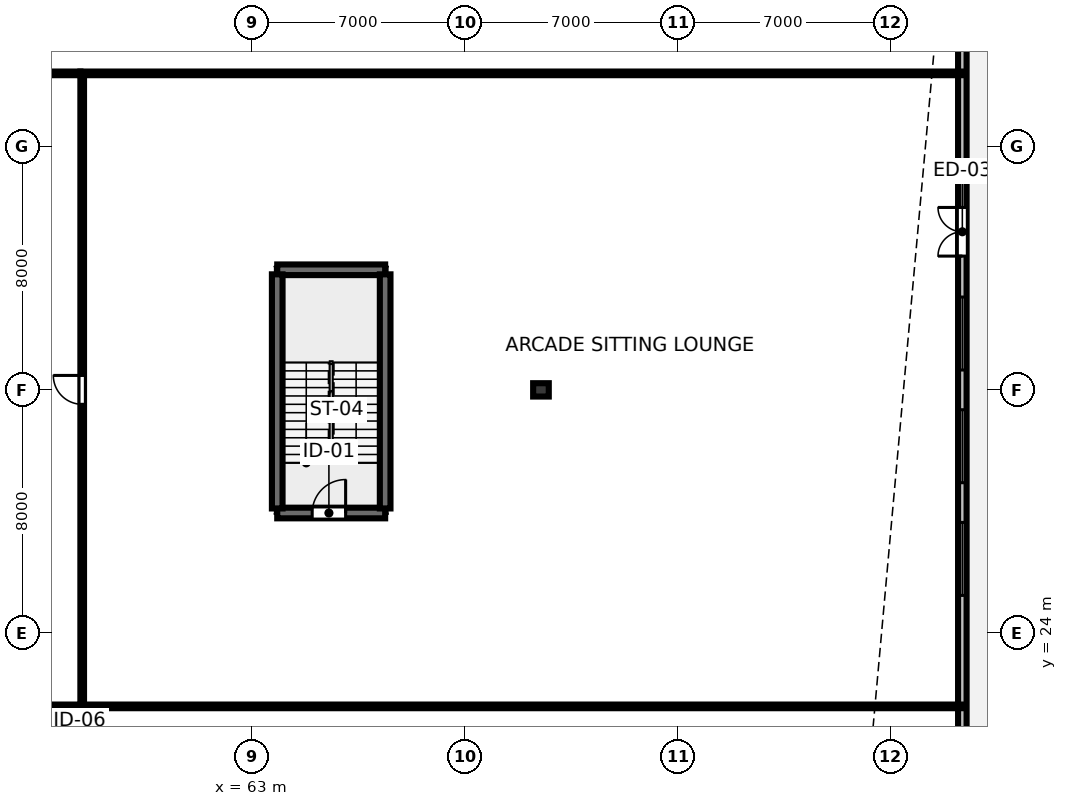
"""IFC4 building model, lengths in metres.
Left out: names, types, materials, properties, quantities, classifications, styles, units other than length and angle.
Written with IfcOpenShell. Run it as: python <this file> out.ifc"""

import sys

from ifc_helpers import new_model, si_unit, direction, frame, frame_2d, origin, origin_2d, place, context, subcontext, project, spatial, rectangle, i_section, extrude, element, fill, save


model = new_model("IFC4")
c1 = context("Model", 3, precision=1e-05, world=origin(), true_north=direction((0.0, 1.0)))
c2 = subcontext(c1, "Body", "Model", "MODEL_VIEW")
j1 = project(units=[si_unit("LENGTHUNIT", "METRE"), si_unit("PLANEANGLEUNIT", "RADIAN")], contexts=[c1])
p1 = place(None, origin())
s1 = spatial("IfcSite", under=j1, at=p1, CompositionType="ELEMENT")
p2 = place(p1, origin())
s2 = spatial("IfcBuilding", under=s1, at=p2, CompositionType="ELEMENT")
p3 = place(p2, frame((0.0, 0.0, 5.0)))
s3 = spatial("IfcBuildingStorey", under=s2, at=p3, CompositionType="ELEMENT", Elevation=5.0)
p4 = place(p3, frame((72.5, 32.0, 0.0), z_axis=(0.0, 0.0, 1.0), x_axis=(0.0, 1.0, 0.0)))
e1 = element("IfcColumn", 1, at=p4, inside=s3, PredefinedType="COLUMN", context=c2, shape_type="SweptSolid", body=[
    extrude(i_section(OverallWidth=0.439, OverallDepth=0.514, WebThickness=0.06, FlangeThickness=0.097, FilletRadius=0.025, at=origin_2d()), origin(), (0.0, 0.0, 1.0), 4.218),
])
p5 = place(p3, frame((86.36, 8.66, 0.0), z_axis=(0.0, 0.0, 1.0), x_axis=(0.0, 1.0, 0.0)))
e2 = element("IfcWall", 2, at=p5, inside=s3, PredefinedType="STANDARD", context=c2, shape_type="SweptSolid", body=[
    extrude(rectangle(XDim=46.68, YDim=0.28, at=frame_2d((23.34, 0.0))), origin(), (0.0, 0.0, 1.0), 4.22),
])
p6 = place(p5, frame((27.74, 0.0, 0.0)))
e3 = element("IfcOpeningElement", 3, at=p6, cuts=e2, PredefinedType="OPENING", context=c2, shape_type="SweptSolid", body=[
    extrude(rectangle(XDim=1.6, YDim=2.15, at=frame_2d((0.8, 1.075))), frame((0.0, 0.15, 0.0), z_axis=(0.0, -1.0, 0.0), x_axis=(1.0, 0.0, 0.0)), (0.0, 0.0, 1.0), 0.3),
])
p7 = place(p5, frame((1.753, 0.0, 0.85)))
e4 = element("IfcOpeningElement", 4, at=p7, cuts=e2, PredefinedType="OPENING", context=c2, shape_type="SweptSolid", body=[
    extrude(rectangle(XDim=2.4, YDim=2.4, at=frame_2d((1.2, 1.2))), frame((0.0, 0.15, 0.0), z_axis=(0.0, -1.0, 0.0), x_axis=(1.0, 0.0, 0.0)), (0.0, 0.0, 1.0), 0.3),
])
p8 = place(p5, frame((5.46, 0.0, 0.85)))
e5 = element("IfcOpeningElement", 5, at=p8, cuts=e2, PredefinedType="OPENING", context=c2, shape_type="SweptSolid", body=[
    extrude(rectangle(XDim=2.4, YDim=2.4, at=frame_2d((1.2, 1.2))), frame((0.0, 0.15, 0.0), z_axis=(0.0, -1.0, 0.0), x_axis=(1.0, 0.0, 0.0)), (0.0, 0.0, 1.0), 0.3),
])
p9 = place(p5, frame((9.167, 0.0, 0.85)))
e6 = element("IfcOpeningElement", 6, at=p9, cuts=e2, PredefinedType="OPENING", context=c2, shape_type="SweptSolid", body=[
    extrude(rectangle(XDim=2.4, YDim=2.4, at=frame_2d((1.2, 1.2))), frame((0.0, 0.15, 0.0), z_axis=(0.0, -1.0, 0.0), x_axis=(1.0, 0.0, 0.0)), (0.0, 0.0, 1.0), 0.3),
])
p10 = place(p5, frame((16.58, 0.0, 0.85)))
e7 = element("IfcOpeningElement", 7, at=p10, cuts=e2, PredefinedType="OPENING", context=c2, shape_type="SweptSolid", body=[
    extrude(rectangle(XDim=2.4, YDim=2.4, at=frame_2d((1.2, 1.2))), frame((0.0, 0.15, 0.0), z_axis=(0.0, -1.0, 0.0), x_axis=(1.0, 0.0, 0.0)), (0.0, 0.0, 1.0), 0.3),
])
p11 = place(p5, frame((20.287, 0.0, 0.85)))
e8 = element("IfcOpeningElement", 8, at=p11, cuts=e2, PredefinedType="OPENING", context=c2, shape_type="SweptSolid", body=[
    extrude(rectangle(XDim=2.4, YDim=2.4, at=frame_2d((1.2, 1.2))), frame((0.0, 0.15, 0.0), z_axis=(0.0, -1.0, 0.0), x_axis=(1.0, 0.0, 0.0)), (0.0, 0.0, 1.0), 0.3),
])
p12 = place(p5, frame((23.993, 0.0, 0.85)))
e9 = element("IfcOpeningElement", 9, at=p12, cuts=e2, PredefinedType="OPENING", context=c2, shape_type="SweptSolid", body=[
    extrude(rectangle(XDim=2.4, YDim=2.4, at=frame_2d((1.2, 1.2))), frame((0.0, 0.15, 0.0), z_axis=(0.0, -1.0, 0.0), x_axis=(1.0, 0.0, 0.0)), (0.0, 0.0, 1.0), 0.3),
])
p13 = place(p5, frame((35.113, 0.0, 0.85)))
e10 = element("IfcOpeningElement", 10, at=p13, cuts=e2, PredefinedType="OPENING", context=c2, shape_type="SweptSolid", body=[
    extrude(rectangle(XDim=2.4, YDim=2.4, at=frame_2d((1.2, 1.2))), frame((0.0, 0.15, 0.0), z_axis=(0.0, -1.0, 0.0), x_axis=(1.0, 0.0, 0.0)), (0.0, 0.0, 1.0), 0.3),
])
p14 = place(p5, frame((38.82, 0.0, 0.85)))
e11 = element("IfcOpeningElement", 11, at=p14, cuts=e2, PredefinedType="OPENING", context=c2, shape_type="SweptSolid", body=[
    extrude(rectangle(XDim=2.4, YDim=2.4, at=frame_2d((1.2, 1.2))), frame((0.0, 0.15, 0.0), z_axis=(0.0, -1.0, 0.0), x_axis=(1.0, 0.0, 0.0)), (0.0, 0.0, 1.0), 0.3),
])
p15 = place(p5, frame((42.527, 0.0, 0.85)))
e12 = element("IfcOpeningElement", 12, at=p15, cuts=e2, PredefinedType="OPENING", context=c2, shape_type="SweptSolid", body=[
    extrude(rectangle(XDim=2.4, YDim=2.4, at=frame_2d((1.2, 1.2))), frame((0.0, 0.15, 0.0), z_axis=(0.0, -1.0, 0.0), x_axis=(1.0, 0.0, 0.0)), (0.0, 0.0, 1.0), 0.3),
])
p16 = place(p3, frame((57.326, 21.59, 0.0), z_axis=(0.0, 0.0, 1.0), x_axis=(0.0, -1.0, 0.0)))
e13 = element("IfcWall", 13, at=p16, inside=s3, PredefinedType="MOVABLE", context=c2, shape_type="SweptSolid", body=[
    extrude(rectangle(XDim=17.25, YDim=0.12, at=frame_2d((8.625, 0.0))), origin(), (0.0, 0.0, 1.0), 3.32),
])
p17 = place(p16, frame((1.4, 0.0, 0.0)))
e14 = element("IfcOpeningElement", 14, at=p17, cuts=e13, PredefinedType="OPENING", context=c2, shape_type="SweptSolid", body=[
    extrude(rectangle(XDim=0.9, YDim=2.15, at=frame_2d((0.45, 1.075))), frame((0.0, 0.07, 0.0), z_axis=(0.0, -1.0, 0.0), x_axis=(1.0, 0.0, 0.0)), (0.0, 0.0, 1.0), 0.14),
])
p18 = place(p3, frame((34.65, 21.59, 0.0), z_axis=(0.0, 0.0, 1.0), x_axis=(1.0, 0.0, 0.0)))
e15 = element("IfcWall", 15, at=p18, inside=s3, PredefinedType="PARTITIONING", context=c2, shape_type="SweptSolid", body=[
    extrude(rectangle(XDim=22.7, YDim=0.12, at=frame_2d((11.35, 0.0))), origin(), (0.0, 0.0, 1.0), 3.32),
])
p19 = place(p18, frame((10.875, 0.0, 0.0)))
e16 = element("IfcOpeningElement", 16, at=p19, cuts=e15, PredefinedType="OPENING", context=c2, shape_type="SweptSolid", body=[
    extrude(rectangle(XDim=0.95, YDim=2.15, at=frame_2d((0.475, 1.075))), frame((0.0, 0.07, 0.0), z_axis=(0.0, -1.0, 0.0), x_axis=(1.0, 0.0, 0.0)), (0.0, 0.0, 1.0), 0.14),
])
p20 = place(p3, frame((34.65, 42.41, 0.0), z_axis=(0.0, 0.0, 1.0), x_axis=(1.0, 0.0, 0.0)))
e17 = element("IfcWall", 17, at=p20, inside=s3, PredefinedType="PARTITIONING", context=c2, shape_type="SweptSolid", body=[
    extrude(rectangle(XDim=22.7, YDim=0.12, at=frame_2d((11.35, 0.0))), origin(), (0.0, 0.0, 1.0), 3.32),
])
p21 = place(p20, frame((11.497, 0.0, 0.0)))
e18 = element("IfcOpeningElement", 18, at=p21, cuts=e17, PredefinedType="OPENING", context=c2, shape_type="SweptSolid", body=[
    extrude(rectangle(XDim=0.95, YDim=2.15, at=frame_2d((0.475, 1.075))), frame((0.0, 0.07, 0.0), z_axis=(0.0, -1.0, 0.0), x_axis=(1.0, 0.0, 0.0)), (0.0, 0.0, 1.0), 0.14),
])
p22 = place(p3, frame((57.41, 21.65, 0.0), z_axis=(0.0, 0.0, 1.0), x_axis=(0.0, 1.0, 0.0)))
e19 = element("IfcWall", 19, at=p22, inside=s3, PredefinedType="PARTITIONING", context=c2, shape_type="SweptSolid", body=[
    extrude(rectangle(XDim=20.7, YDim=0.12, at=frame_2d((10.35, 0.0))), origin(), (0.0, 0.0, 1.0), 3.32),
])
p23 = place(p22, frame((9.875, 0.0, 0.0)))
e20 = element("IfcOpeningElement", 20, at=p23, cuts=e19, PredefinedType="OPENING", context=c2, shape_type="SweptSolid", body=[
    extrude(rectangle(XDim=0.95, YDim=2.15, at=frame_2d((0.475, 1.075))), frame((0.0, 0.07, 0.0), z_axis=(0.0, -1.0, 0.0), x_axis=(1.0, 0.0, 0.0)), (0.0, 0.0, 1.0), 0.14),
])
for number, where, z_axis, x_axis in (
    (21, (57.35, 21.59, 0.0), (0.0, 0.0, 1.0), (1.0, 0.0, 0.0)),
    (22, (57.35, 42.41, 0.0), (0.0, 0.0, 1.0), (1.0, 0.0, 0.0)),
):
    element("IfcWall", number, at=place(p3, frame(where, z_axis=z_axis, x_axis=x_axis)), inside=s3, PredefinedType="PARTITIONING", context=c2, shape_type="SweptSolid", body=[
        extrude(rectangle(XDim=29.01, YDim=0.12, at=frame_2d((14.505, 0.0))), origin(), (0.0, 0.0, 1.0), 3.32),
    ])
p24 = place(p3, frame((63.825, 27.95, 0.0), z_axis=(0.0, 0.0, 1.0), x_axis=(1.0, 0.0, 0.0)))
e23 = element("IfcWall", 23, at=p24, inside=s3, PredefinedType="SHEAR", context=c2, shape_type="SweptSolid", body=[
    extrude(rectangle(XDim=3.55, YDim=0.35, at=frame_2d((1.775, 0.0))), origin(), (0.0, 0.0, 1.0), 4.5),
])
p25 = place(p24, frame((1.15, 0.0, 0.0)))
e24 = element("IfcOpeningElement", 24, at=p25, cuts=e23, PredefinedType="OPENING", context=c2, shape_type="SweptSolid", body=[
    extrude(rectangle(XDim=1.1, YDim=2.15, at=frame_2d((0.55, 1.075))), frame((0.0, 0.185, 0.0), z_axis=(0.0, -1.0, 0.0), x_axis=(1.0, 0.0, 0.0)), (0.0, 0.0, 1.0), 0.37),
])
p26 = place(p3, frame((63.825, 35.95, 0.0), z_axis=(0.0, 0.0, 1.0), x_axis=(1.0, 0.0, 0.0)))
e25 = element("IfcWall", 25, at=p26, inside=s3, PredefinedType="SHEAR", context=c2, shape_type="SweptSolid", body=[
    extrude(rectangle(XDim=3.55, YDim=0.35, at=frame_2d((1.775, 0.0))), origin(), (0.0, 0.0, 1.0), 4.5),
])
for number, where, z_axis, x_axis in (
    (26, (63.825, 28.1, 0.0), (0.0, 0.0, 1.0), (0.0, 1.0, 0.0)),
    (27, (67.375, 28.1, 0.0), (0.0, 0.0, 1.0), (0.0, 1.0, 0.0)),
):
    element("IfcWall", number, at=place(p3, frame(where, z_axis=z_axis, x_axis=x_axis)), inside=s3, PredefinedType="SHEAR", context=c2, shape_type="SweptSolid", body=[
        extrude(rectangle(XDim=7.7, YDim=0.35, at=frame_2d((3.85, 0.0))), origin(), (0.0, 0.0, 1.0), 4.5),
    ])
p27 = place(p6, origin())
e28 = element("IfcDoor", 28, at=p27, inside=s3, OperationType="DOUBLE_DOOR_SINGLE_SWING", PredefinedType="DOOR", context=c2, shape_type="SweptSolid", body=[
    extrude(rectangle(XDim=1.6, YDim=2.15, at=frame_2d((0.8, 1.075))), frame((0.0, 0.025, 0.0), z_axis=(0.0, -1.0, 0.0), x_axis=(1.0, 0.0, 0.0)), (0.0, 0.0, 1.0), 0.05),
])
fill(e3, e28)
p28 = place(p10, origin())
e29 = element("IfcWindow", 29, at=p28, inside=s3, PartitioningType="SINGLE_PANEL", PredefinedType="WINDOW", context=c2, shape_type="SweptSolid", body=[
    extrude(rectangle(XDim=2.4, YDim=2.4, at=frame_2d((1.2, 1.2))), frame((0.0, 0.03, 0.0), z_axis=(0.0, -1.0, 0.0), x_axis=(1.0, 0.0, 0.0)), (0.0, 0.0, 1.0), 0.06),
])
fill(e7, e29)
p29 = place(p11, origin())
e30 = element("IfcWindow", 30, at=p29, inside=s3, PartitioningType="SINGLE_PANEL", PredefinedType="WINDOW", context=c2, shape_type="SweptSolid", body=[
    extrude(rectangle(XDim=2.4, YDim=2.4, at=frame_2d((1.2, 1.2))), frame((0.0, 0.03, 0.0), z_axis=(0.0, -1.0, 0.0), x_axis=(1.0, 0.0, 0.0)), (0.0, 0.0, 1.0), 0.06),
])
fill(e8, e30)
p30 = place(p12, origin())
e31 = element("IfcWindow", 31, at=p30, inside=s3, PartitioningType="SINGLE_PANEL", PredefinedType="WINDOW", context=c2, shape_type="SweptSolid", body=[
    extrude(rectangle(XDim=2.4, YDim=2.4, at=frame_2d((1.2, 1.2))), frame((0.0, 0.03, 0.0), z_axis=(0.0, -1.0, 0.0), x_axis=(1.0, 0.0, 0.0)), (0.0, 0.0, 1.0), 0.06),
])
fill(e9, e31)
p31 = place(p23, origin())
e32 = element("IfcDoor", 32, at=p31, inside=s3, OperationType="SINGLE_SWING_RIGHT", PredefinedType="DOOR", context=c2, shape_type="SweptSolid", body=[
    extrude(rectangle(XDim=0.95, YDim=2.15, at=frame_2d((0.475, 1.075))), frame((0.0, 0.025, 0.0), z_axis=(0.0, -1.0, 0.0), x_axis=(1.0, 0.0, 0.0)), (0.0, 0.0, 1.0), 0.05),
])
fill(e20, e32)
p32 = place(p25, origin())
e33 = element("IfcDoor", 33, at=p32, inside=s3, OperationType="SINGLE_SWING_RIGHT", PredefinedType="DOOR", context=c2, shape_type="SweptSolid", body=[
    extrude(rectangle(XDim=1.1, YDim=2.15, at=frame_2d((0.55, 1.075))), frame((0.0, 0.025, 0.0), z_axis=(0.0, -1.0, 0.0), x_axis=(1.0, 0.0, 0.0)), (0.0, 0.0, 1.0), 0.05),
])
fill(e24, e33)
save(model, sys.argv[1])
